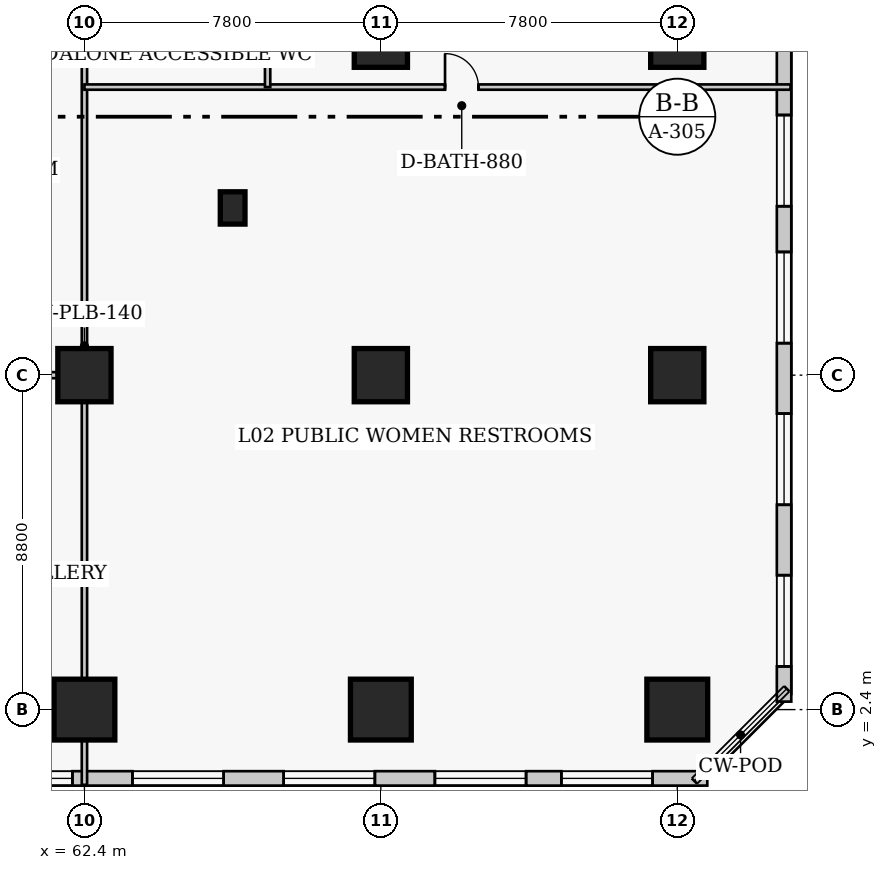
"""IFC4 building model, lengths in metres.
Left out: names, types, materials, properties, quantities, classifications, styles, units other than length and angle.
Written with IfcOpenShell. Run it as: python <this file> out.ifc"""

import sys

from ifc_helpers import new_model, si_unit, direction, frame, frame_2d, origin, origin_2d, place, context, subcontext, project, spatial, rectangle, extrude, element, fill, save


model = new_model("IFC4")
c1 = context("Model", 3, precision=1e-05, world=origin(), true_north=direction((0.0, 1.0)))
c2 = subcontext(c1, "Body", "Model", "MODEL_VIEW")
j1 = project(units=[si_unit("LENGTHUNIT", "METRE"), si_unit("PLANEANGLEUNIT", "RADIAN")], contexts=[c1])
p1 = place(None, origin())
s1 = spatial("IfcSite", under=j1, at=p1, CompositionType="ELEMENT")
p2 = place(p1, origin())
s2 = spatial("IfcBuilding", under=s1, at=p2, CompositionType="ELEMENT")
p3 = place(p2, frame((0.0, 0.0, 10.4)))
s3 = spatial("IfcBuildingStorey", under=s2, at=p3, CompositionType="ELEMENT", Elevation=10.4)
p4 = place(p3, frame((62.4, 2.4, 0.0), z_axis=(0.0, 0.0, 1.0), x_axis=(1.0, 0.0, 0.0)))
e1 = element("IfcColumn", 1, at=p4, inside=s3, PredefinedType="COLUMN", context=c2, shape_type="SweptSolid", body=[
    extrude(rectangle(XDim=1.6, YDim=1.6, at=origin_2d()), origin(), (0.0, 0.0, 1.0), 5.4),
])
p5 = place(p3, frame((62.4, 11.2, 0.0), z_axis=(0.0, 0.0, 1.0), x_axis=(1.0, 0.0, 0.0)))
e2 = element("IfcColumn", 2, at=p5, inside=s3, PredefinedType="COLUMN", context=c2, shape_type="SweptSolid", body=[
    extrude(rectangle(XDim=1.4, YDim=1.4, at=origin_2d()), origin(), (0.0, 0.0, 1.0), 5.4),
])
p6 = place(p3, frame((70.2, 2.4, 0.0), z_axis=(0.0, 0.0, 1.0), x_axis=(1.0, 0.0, 0.0)))
e3 = element("IfcColumn", 3, at=p6, inside=s3, PredefinedType="COLUMN", context=c2, shape_type="SweptSolid", body=[
    extrude(rectangle(XDim=1.6, YDim=1.6, at=origin_2d()), origin(), (0.0, 0.0, 1.0), 5.4),
])
for number, where, z_axis, x_axis in (
    (4, (70.2, 11.2, 0.0), (0.0, 0.0, 1.0), (1.0, 0.0, 0.0)),
    (5, (70.2, 20.0, 0.0), (0.0, 0.0, 1.0), (1.0, 0.0, 0.0)),
):
    element("IfcColumn", number, at=place(p3, frame(where, z_axis=z_axis, x_axis=x_axis)), inside=s3, PredefinedType="COLUMN", context=c2, shape_type="SweptSolid", body=[
        extrude(rectangle(XDim=1.4, YDim=1.4, at=origin_2d()), origin(), (0.0, 0.0, 1.0), 5.4),
    ])
p7 = place(p3, frame((78.0, 2.4, 0.0), z_axis=(0.0, 0.0, 1.0), x_axis=(1.0, 0.0, 0.0)))
e6 = element("IfcColumn", 6, at=p7, inside=s3, PredefinedType="COLUMN", context=c2, shape_type="SweptSolid", body=[
    extrude(rectangle(XDim=1.6, YDim=1.6, at=origin_2d()), origin(), (0.0, 0.0, 1.0), 5.4),
])
for number, where, z_axis, x_axis in (
    (7, (78.0, 11.2, 0.0), (0.0, 0.0, 1.0), (1.0, 0.0, 0.0)),
    (8, (78.0, 20.0, 0.0), (0.0, 0.0, 1.0), (1.0, 0.0, 0.0)),
):
    element("IfcColumn", number, at=place(p3, frame(where, z_axis=z_axis, x_axis=x_axis)), inside=s3, PredefinedType="COLUMN", context=c2, shape_type="SweptSolid", body=[
        extrude(rectangle(XDim=1.4, YDim=1.4, at=origin_2d()), origin(), (0.0, 0.0, 1.0), 5.4),
    ])
p8 = place(p3, frame((66.3, 15.6, 0.0), z_axis=(0.0, 0.0, 1.0), x_axis=(1.0, 0.0, 0.0)))
e9 = element("IfcColumn", 9, at=p8, inside=s3, PredefinedType="PILASTER", context=c2, shape_type="SweptSolid", body=[
    extrude(rectangle(XDim=0.65, YDim=0.85, at=origin_2d()), origin(), (0.0, 0.0, 1.0), 5.4),
])
p9 = place(p3, frame((-0.79, 0.59, 0.0), z_axis=(0.0, 0.0, 1.0), x_axis=(1.0, 0.0, 0.0)))
e10 = element("IfcWall", 10, at=p9, inside=s3, PredefinedType="SOLIDWALL", context=c2, shape_type="SweptSolid", body=[
    extrude(rectangle(XDim=79.58, YDim=0.38, at=frame_2d((39.79, 0.0))), origin(), (0.0, 0.0, 1.0), 5.1),
])
p10 = place(p9, frame((1.439, 0.0, 0.75)))
e11 = element("IfcOpeningElement", 11, at=p10, cuts=e10, PredefinedType="OPENING", context=c2, shape_type="SweptSolid", body=[
    extrude(rectangle(XDim=2.4, YDim=2.2, at=frame_2d((1.2, 1.1))), frame((0.0, 0.2, 0.0), z_axis=(0.0, -1.0, 0.0), x_axis=(1.0, 0.0, 0.0)), (0.0, 0.0, 1.0), 0.4),
])
p11 = place(p9, frame((4.769, 0.0, 0.75)))
e12 = element("IfcOpeningElement", 12, at=p11, cuts=e10, PredefinedType="OPENING", context=c2, shape_type="SweptSolid", body=[
    extrude(rectangle(XDim=2.4, YDim=2.2, at=frame_2d((1.2, 1.1))), frame((0.0, 0.2, 0.0), z_axis=(0.0, -1.0, 0.0), x_axis=(1.0, 0.0, 0.0)), (0.0, 0.0, 1.0), 0.4),
])
p12 = place(p9, frame((16.706, 0.0, 0.75)))
e13 = element("IfcOpeningElement", 13, at=p12, cuts=e10, PredefinedType="OPENING", context=c2, shape_type="SweptSolid", body=[
    extrude(rectangle(XDim=2.4, YDim=2.2, at=frame_2d((1.2, 1.1))), frame((0.0, 0.2, 0.0), z_axis=(0.0, -1.0, 0.0), x_axis=(1.0, 0.0, 0.0)), (0.0, 0.0, 1.0), 0.4),
])
p13 = place(p9, frame((20.685, 0.0, 0.75)))
e14 = element("IfcOpeningElement", 14, at=p13, cuts=e10, PredefinedType="OPENING", context=c2, shape_type="SweptSolid", body=[
    extrude(rectangle(XDim=2.4, YDim=2.2, at=frame_2d((1.2, 1.1))), frame((0.0, 0.2, 0.0), z_axis=(0.0, -1.0, 0.0), x_axis=(1.0, 0.0, 0.0)), (0.0, 0.0, 1.0), 0.4),
])
p14 = place(p9, frame((24.664, 0.0, 0.75)))
e15 = element("IfcOpeningElement", 15, at=p14, cuts=e10, PredefinedType="OPENING", context=c2, shape_type="SweptSolid", body=[
    extrude(rectangle(XDim=2.4, YDim=2.2, at=frame_2d((1.2, 1.1))), frame((0.0, 0.2, 0.0), z_axis=(0.0, -1.0, 0.0), x_axis=(1.0, 0.0, 0.0)), (0.0, 0.0, 1.0), 0.4),
])
p15 = place(p9, frame((28.643, 0.0, 0.75)))
e16 = element("IfcOpeningElement", 16, at=p15, cuts=e10, PredefinedType="OPENING", context=c2, shape_type="SweptSolid", body=[
    extrude(rectangle(XDim=2.4, YDim=2.2, at=frame_2d((1.2, 1.1))), frame((0.0, 0.2, 0.0), z_axis=(0.0, -1.0, 0.0), x_axis=(1.0, 0.0, 0.0)), (0.0, 0.0, 1.0), 0.4),
])
p16 = place(p9, frame((33.271, 0.0, 0.75)))
e17 = element("IfcOpeningElement", 17, at=p16, cuts=e10, PredefinedType="OPENING", context=c2, shape_type="SweptSolid", body=[
    extrude(rectangle(XDim=2.4, YDim=2.2, at=frame_2d((1.2, 1.1))), frame((0.0, 0.2, 0.0), z_axis=(0.0, -1.0, 0.0), x_axis=(1.0, 0.0, 0.0)), (0.0, 0.0, 1.0), 0.4),
])
p17 = place(p9, frame((37.75, 0.0, 0.75)))
e18 = element("IfcOpeningElement", 18, at=p17, cuts=e10, PredefinedType="OPENING", context=c2, shape_type="SweptSolid", body=[
    extrude(rectangle(XDim=2.4, YDim=2.2, at=frame_2d((1.2, 1.1))), frame((0.0, 0.2, 0.0), z_axis=(0.0, -1.0, 0.0), x_axis=(1.0, 0.0, 0.0)), (0.0, 0.0, 1.0), 0.4),
])
p18 = place(p9, frame((44.559, 0.0, 0.75)))
e19 = element("IfcOpeningElement", 19, at=p18, cuts=e10, PredefinedType="OPENING", context=c2, shape_type="SweptSolid", body=[
    extrude(rectangle(XDim=2.4, YDim=2.2, at=frame_2d((1.2, 1.1))), frame((0.0, 0.2, 0.0), z_axis=(0.0, -1.0, 0.0), x_axis=(1.0, 0.0, 0.0)), (0.0, 0.0, 1.0), 0.4),
])
p19 = place(p9, frame((48.538, 0.0, 0.75)))
e20 = element("IfcOpeningElement", 20, at=p19, cuts=e10, PredefinedType="OPENING", context=c2, shape_type="SweptSolid", body=[
    extrude(rectangle(XDim=2.4, YDim=2.2, at=frame_2d((1.2, 1.1))), frame((0.0, 0.2, 0.0), z_axis=(0.0, -1.0, 0.0), x_axis=(1.0, 0.0, 0.0)), (0.0, 0.0, 1.0), 0.4),
])
p20 = place(p9, frame((52.517, 0.0, 0.75)))
e21 = element("IfcOpeningElement", 21, at=p20, cuts=e10, PredefinedType="OPENING", context=c2, shape_type="SweptSolid", body=[
    extrude(rectangle(XDim=2.4, YDim=2.2, at=frame_2d((1.2, 1.1))), frame((0.0, 0.2, 0.0), z_axis=(0.0, -1.0, 0.0), x_axis=(1.0, 0.0, 0.0)), (0.0, 0.0, 1.0), 0.4),
])
p21 = place(p9, frame((56.496, 0.0, 0.75)))
e22 = element("IfcOpeningElement", 22, at=p21, cuts=e10, PredefinedType="OPENING", context=c2, shape_type="SweptSolid", body=[
    extrude(rectangle(XDim=2.4, YDim=2.2, at=frame_2d((1.2, 1.1))), frame((0.0, 0.2, 0.0), z_axis=(0.0, -1.0, 0.0), x_axis=(1.0, 0.0, 0.0)), (0.0, 0.0, 1.0), 0.4),
])
p22 = place(p9, frame((60.475, 0.0, 0.75)))
e23 = element("IfcOpeningElement", 23, at=p22, cuts=e10, PredefinedType="OPENING", context=c2, shape_type="SweptSolid", body=[
    extrude(rectangle(XDim=2.4, YDim=2.2, at=frame_2d((1.2, 1.1))), frame((0.0, 0.2, 0.0), z_axis=(0.0, -1.0, 0.0), x_axis=(1.0, 0.0, 0.0)), (0.0, 0.0, 1.0), 0.4),
])
p23 = place(p9, frame((64.454, 0.0, 0.75)))
e24 = element("IfcOpeningElement", 24, at=p23, cuts=e10, PredefinedType="OPENING", context=c2, shape_type="SweptSolid", body=[
    extrude(rectangle(XDim=2.4, YDim=2.2, at=frame_2d((1.2, 1.1))), frame((0.0, 0.2, 0.0), z_axis=(0.0, -1.0, 0.0), x_axis=(1.0, 0.0, 0.0)), (0.0, 0.0, 1.0), 0.4),
])
p24 = place(p9, frame((68.433, 0.0, 0.75)))
e25 = element("IfcOpeningElement", 25, at=p24, cuts=e10, PredefinedType="OPENING", context=c2, shape_type="SweptSolid", body=[
    extrude(rectangle(XDim=2.4, YDim=2.2, at=frame_2d((1.2, 1.1))), frame((0.0, 0.2, 0.0), z_axis=(0.0, -1.0, 0.0), x_axis=(1.0, 0.0, 0.0)), (0.0, 0.0, 1.0), 0.4),
])
p25 = place(p9, frame((72.412, 0.0, 0.75)))
e26 = element("IfcOpeningElement", 26, at=p25, cuts=e10, PredefinedType="OPENING", context=c2, shape_type="SweptSolid", body=[
    extrude(rectangle(XDim=2.4, YDim=2.2, at=frame_2d((1.2, 1.1))), frame((0.0, 0.2, 0.0), z_axis=(0.0, -1.0, 0.0), x_axis=(1.0, 0.0, 0.0)), (0.0, 0.0, 1.0), 0.4),
])
p26 = place(p9, frame((75.74, 0.0, 0.75)))
e27 = element("IfcOpeningElement", 27, at=p26, cuts=e10, PredefinedType="OPENING", context=c2, shape_type="SweptSolid", body=[
    extrude(rectangle(XDim=2.4, YDim=2.2, at=frame_2d((1.2, 1.1))), frame((0.0, 0.2, 0.0), z_axis=(0.0, -1.0, 0.0), x_axis=(1.0, 0.0, 0.0)), (0.0, 0.0, 1.0), 0.4),
])
p27 = place(p3, frame((80.81, 2.61, 0.0), z_axis=(0.0, 0.0, 1.0), x_axis=(0.0, 1.0, 0.0)))
e28 = element("IfcWall", 28, at=p27, inside=s3, PredefinedType="SOLIDWALL", context=c2, shape_type="SweptSolid", body=[
    extrude(rectangle(XDim=46.78, YDim=0.38, at=frame_2d((23.39, 0.0))), origin(), (0.0, 0.0, 1.0), 5.1),
])
p28 = place(p27, frame((0.927, 0.0, 0.75)))
e29 = element("IfcOpeningElement", 29, at=p28, cuts=e28, PredefinedType="OPENING", context=c2, shape_type="SweptSolid", body=[
    extrude(rectangle(XDim=2.4, YDim=2.2, at=frame_2d((1.2, 1.1))), frame((0.0, 0.2, 0.0), z_axis=(0.0, -1.0, 0.0), x_axis=(1.0, 0.0, 0.0)), (0.0, 0.0, 1.0), 0.4),
])
p29 = place(p27, frame((5.179, 0.0, 0.75)))
e30 = element("IfcOpeningElement", 30, at=p29, cuts=e28, PredefinedType="OPENING", context=c2, shape_type="SweptSolid", body=[
    extrude(rectangle(XDim=2.4, YDim=2.2, at=frame_2d((1.2, 1.1))), frame((0.0, 0.2, 0.0), z_axis=(0.0, -1.0, 0.0), x_axis=(1.0, 0.0, 0.0)), (0.0, 0.0, 1.0), 0.4),
])
p30 = place(p27, frame((9.432, 0.0, 0.75)))
e31 = element("IfcOpeningElement", 31, at=p30, cuts=e28, PredefinedType="OPENING", context=c2, shape_type="SweptSolid", body=[
    extrude(rectangle(XDim=2.4, YDim=2.2, at=frame_2d((1.2, 1.1))), frame((0.0, 0.2, 0.0), z_axis=(0.0, -1.0, 0.0), x_axis=(1.0, 0.0, 0.0)), (0.0, 0.0, 1.0), 0.4),
])
p31 = place(p27, frame((13.034, 0.0, 0.75)))
e32 = element("IfcOpeningElement", 32, at=p31, cuts=e28, PredefinedType="OPENING", context=c2, shape_type="SweptSolid", body=[
    extrude(rectangle(XDim=2.4, YDim=2.2, at=frame_2d((1.2, 1.1))), frame((0.0, 0.2, 0.0), z_axis=(0.0, -1.0, 0.0), x_axis=(1.0, 0.0, 0.0)), (0.0, 0.0, 1.0), 0.4),
])
p32 = place(p27, frame((17.937, 0.0, 0.75)))
e33 = element("IfcOpeningElement", 33, at=p32, cuts=e28, PredefinedType="OPENING", context=c2, shape_type="SweptSolid", body=[
    extrude(rectangle(XDim=2.4, YDim=2.2, at=frame_2d((1.2, 1.1))), frame((0.0, 0.2, 0.0), z_axis=(0.0, -1.0, 0.0), x_axis=(1.0, 0.0, 0.0)), (0.0, 0.0, 1.0), 0.4),
])
p33 = place(p27, frame((26.443, 0.0, 0.75)))
e34 = element("IfcOpeningElement", 34, at=p33, cuts=e28, PredefinedType="OPENING", context=c2, shape_type="SweptSolid", body=[
    extrude(rectangle(XDim=2.4, YDim=2.2, at=frame_2d((1.2, 1.1))), frame((0.0, 0.2, 0.0), z_axis=(0.0, -1.0, 0.0), x_axis=(1.0, 0.0, 0.0)), (0.0, 0.0, 1.0), 0.4),
])
p34 = place(p27, frame((30.696, 0.0, 0.75)))
e35 = element("IfcOpeningElement", 35, at=p34, cuts=e28, PredefinedType="OPENING", context=c2, shape_type="SweptSolid", body=[
    extrude(rectangle(XDim=2.4, YDim=2.2, at=frame_2d((1.2, 1.1))), frame((0.0, 0.2, 0.0), z_axis=(0.0, -1.0, 0.0), x_axis=(1.0, 0.0, 0.0)), (0.0, 0.0, 1.0), 0.4),
])
p35 = place(p27, frame((34.948, 0.0, 0.75)))
e36 = element("IfcOpeningElement", 36, at=p35, cuts=e28, PredefinedType="OPENING", context=c2, shape_type="SweptSolid", body=[
    extrude(rectangle(XDim=2.4, YDim=2.2, at=frame_2d((1.2, 1.1))), frame((0.0, 0.2, 0.0), z_axis=(0.0, -1.0, 0.0), x_axis=(1.0, 0.0, 0.0)), (0.0, 0.0, 1.0), 0.4),
])
p36 = place(p27, frame((39.201, 0.0, 0.75)))
e37 = element("IfcOpeningElement", 37, at=p36, cuts=e28, PredefinedType="OPENING", context=c2, shape_type="SweptSolid", body=[
    extrude(rectangle(XDim=2.4, YDim=2.2, at=frame_2d((1.2, 1.1))), frame((0.0, 0.2, 0.0), z_axis=(0.0, -1.0, 0.0), x_axis=(1.0, 0.0, 0.0)), (0.0, 0.0, 1.0), 0.4),
])
p37 = place(p27, frame((43.454, 0.0, 0.75)))
e38 = element("IfcOpeningElement", 38, at=p37, cuts=e28, PredefinedType="OPENING", context=c2, shape_type="SweptSolid", body=[
    extrude(rectangle(XDim=2.4, YDim=2.2, at=frame_2d((1.2, 1.1))), frame((0.0, 0.2, 0.0), z_axis=(0.0, -1.0, 0.0), x_axis=(1.0, 0.0, 0.0)), (0.0, 0.0, 1.0), 0.4),
])
p38 = place(p3, frame((14.4, 11.2, 0.0), z_axis=(0.0, 0.0, 1.0), x_axis=(1.0, 0.0, 0.0)))
e39 = element("IfcWall", 39, at=p38, inside=s3, PredefinedType="PARTITIONING", context=c2, shape_type="SweptSolid", body=[
    extrude(rectangle(XDim=48.0, YDim=0.16, at=frame_2d((24.0, 0.0))), origin(), (0.0, 0.0, 1.0), 4.06),
])
p39 = place(p38, frame((28.55, 0.0, 0.0)))
e40 = element("IfcOpeningElement", 40, at=p39, cuts=e39, PredefinedType="OPENING", context=c2, shape_type="SweptSolid", body=[
    extrude(rectangle(XDim=1.1, YDim=2.15, at=frame_2d((0.55, 1.075))), frame((0.0, 0.09, 0.0), z_axis=(0.0, -1.0, 0.0), x_axis=(1.0, 0.0, 0.0)), (0.0, 0.0, 1.0), 0.18),
])
p40 = place(p38, frame((19.0, 0.0, 0.0)))
e41 = element("IfcOpeningElement", 41, at=p40, cuts=e39, PredefinedType="OPENING", context=c2, shape_type="SweptSolid", body=[
    extrude(rectangle(XDim=2.2, YDim=2.4, at=frame_2d((1.1, 1.2))), frame((0.0, 0.09, 0.0), z_axis=(0.0, -1.0, 0.0), x_axis=(1.0, 0.0, 0.0)), (0.0, 0.0, 1.0), 0.18),
])
p41 = place(p38, frame((34.688, 0.0, 0.0)))
e42 = element("IfcOpeningElement", 42, at=p41, cuts=e39, PredefinedType="OPENING", context=c2, shape_type="SweptSolid", body=[
    extrude(rectangle(XDim=2.2, YDim=2.4, at=frame_2d((1.1, 1.2))), frame((0.0, 0.09, 0.0), z_axis=(0.0, -1.0, 0.0), x_axis=(1.0, 0.0, 0.0)), (0.0, 0.0, 1.0), 0.18),
])
p42 = place(p3, frame((62.4, 0.42, 0.0), z_axis=(0.0, 0.0, 1.0), x_axis=(0.0, 1.0, 0.0)))
e43 = element("IfcWall", 43, at=p42, inside=s3, PredefinedType="PLUMBINGWALL", context=c2, shape_type="SweptSolid", body=[
    extrude(rectangle(XDim=23.1, YDim=0.14, at=frame_2d((11.55, 0.0))), origin(), (0.0, 0.0, 1.0), 4.35),
])
p43 = place(p3, frame((62.4, 18.78, 0.0), z_axis=(0.0, 0.0, 1.0), x_axis=(1.0, 0.0, 0.0)))
e44 = element("IfcWall", 44, at=p43, inside=s3, PredefinedType="PLUMBINGWALL", context=c2, shape_type="SweptSolid", body=[
    extrude(rectangle(XDim=18.58, YDim=0.14, at=frame_2d((9.29, 0.0))), origin(), (0.0, 0.0, 1.0), 5.1),
])
p44 = place(p43, frame((9.489, 0.0, 0.0)))
e45 = element("IfcOpeningElement", 45, at=p44, cuts=e44, PredefinedType="OPENING", context=c2, shape_type="SweptSolid", body=[
    extrude(rectangle(XDim=0.88, YDim=2.05, at=frame_2d((0.44, 1.025))), frame((0.0, 0.08, 0.0), z_axis=(0.0, -1.0, 0.0), x_axis=(1.0, 0.0, 0.0)), (0.0, 0.0, 1.0), 0.16),
])
p45 = place(p3, frame((67.22, 18.78, 0.0), z_axis=(0.0, 0.0, 1.0), x_axis=(0.0, 1.0, 0.0)))
e46 = element("IfcWall", 46, at=p45, inside=s3, PredefinedType="PLUMBINGWALL", context=c2, shape_type="SweptSolid", body=[
    extrude(rectangle(XDim=4.74, YDim=0.14, at=frame_2d((2.37, 0.0))), origin(), (0.0, 0.0, 1.0), 5.1),
])
p46 = place(p22, origin())
e47 = element("IfcWindow", 47, at=p46, inside=s3, PartitioningType="SINGLE_PANEL", PredefinedType="WINDOW", context=c2, shape_type="SweptSolid", body=[
    extrude(rectangle(XDim=2.4, YDim=2.2, at=frame_2d((1.2, 1.1))), frame((0.0, 0.03, 0.0), z_axis=(0.0, -1.0, 0.0), x_axis=(1.0, 0.0, 0.0)), (0.0, 0.0, 1.0), 0.06),
])
fill(e23, e47)
p47 = place(p23, origin())
e48 = element("IfcWindow", 48, at=p47, inside=s3, PartitioningType="SINGLE_PANEL", PredefinedType="WINDOW", context=c2, shape_type="SweptSolid", body=[
    extrude(rectangle(XDim=2.4, YDim=2.2, at=frame_2d((1.2, 1.1))), frame((0.0, 0.03, 0.0), z_axis=(0.0, -1.0, 0.0), x_axis=(1.0, 0.0, 0.0)), (0.0, 0.0, 1.0), 0.06),
])
fill(e24, e48)
p48 = place(p24, origin())
e49 = element("IfcWindow", 49, at=p48, inside=s3, PartitioningType="SINGLE_PANEL", PredefinedType="WINDOW", context=c2, shape_type="SweptSolid", body=[
    extrude(rectangle(XDim=2.4, YDim=2.2, at=frame_2d((1.2, 1.1))), frame((0.0, 0.03, 0.0), z_axis=(0.0, -1.0, 0.0), x_axis=(1.0, 0.0, 0.0)), (0.0, 0.0, 1.0), 0.06),
])
fill(e25, e49)
p49 = place(p25, origin())
e50 = element("IfcWindow", 50, at=p49, inside=s3, PartitioningType="SINGLE_PANEL", PredefinedType="WINDOW", context=c2, shape_type="SweptSolid", body=[
    extrude(rectangle(XDim=2.4, YDim=2.2, at=frame_2d((1.2, 1.1))), frame((0.0, 0.03, 0.0), z_axis=(0.0, -1.0, 0.0), x_axis=(1.0, 0.0, 0.0)), (0.0, 0.0, 1.0), 0.06),
])
fill(e26, e50)
p50 = place(p26, origin())
e51 = element("IfcWindow", 51, at=p50, inside=s3, PartitioningType="SINGLE_PANEL", PredefinedType="WINDOW", context=c2, shape_type="SweptSolid", body=[
    extrude(rectangle(XDim=2.4, YDim=2.2, at=frame_2d((1.2, 1.1))), frame((0.0, 0.03, 0.0), z_axis=(0.0, -1.0, 0.0), x_axis=(1.0, 0.0, 0.0)), (0.0, 0.0, 1.0), 0.06),
])
fill(e27, e51)
p51 = place(p28, origin())
e52 = element("IfcWindow", 52, at=p51, inside=s3, PartitioningType="SINGLE_PANEL", PredefinedType="WINDOW", context=c2, shape_type="SweptSolid", body=[
    extrude(rectangle(XDim=2.4, YDim=2.2, at=frame_2d((1.2, 1.1))), frame((0.0, 0.03, 0.0), z_axis=(0.0, -1.0, 0.0), x_axis=(1.0, 0.0, 0.0)), (0.0, 0.0, 1.0), 0.06),
])
fill(e29, e52)
p52 = place(p29, origin())
e53 = element("IfcWindow", 53, at=p52, inside=s3, PartitioningType="SINGLE_PANEL", PredefinedType="WINDOW", context=c2, shape_type="SweptSolid", body=[
    extrude(rectangle(XDim=2.4, YDim=2.2, at=frame_2d((1.2, 1.1))), frame((0.0, 0.03, 0.0), z_axis=(0.0, -1.0, 0.0), x_axis=(1.0, 0.0, 0.0)), (0.0, 0.0, 1.0), 0.06),
])
fill(e30, e53)
p53 = place(p30, origin())
e54 = element("IfcWindow", 54, at=p53, inside=s3, PartitioningType="SINGLE_PANEL", PredefinedType="WINDOW", context=c2, shape_type="SweptSolid", body=[
    extrude(rectangle(XDim=2.4, YDim=2.2, at=frame_2d((1.2, 1.1))), frame((0.0, 0.03, 0.0), z_axis=(0.0, -1.0, 0.0), x_axis=(1.0, 0.0, 0.0)), (0.0, 0.0, 1.0), 0.06),
])
fill(e31, e54)
p54 = place(p31, origin())
e55 = element("IfcWindow", 55, at=p54, inside=s3, PartitioningType="SINGLE_PANEL", PredefinedType="WINDOW", context=c2, shape_type="SweptSolid", body=[
    extrude(rectangle(XDim=2.4, YDim=2.2, at=frame_2d((1.2, 1.1))), frame((0.0, 0.03, 0.0), z_axis=(0.0, -1.0, 0.0), x_axis=(1.0, 0.0, 0.0)), (0.0, 0.0, 1.0), 0.06),
])
fill(e32, e55)
p55 = place(p44, origin())
e56 = element("IfcDoor", 56, at=p55, inside=s3, OperationType="SINGLE_SWING_LEFT", PredefinedType="DOOR", context=c2, shape_type="SweptSolid", body=[
    extrude(rectangle(XDim=0.88, YDim=2.05, at=frame_2d((0.44, 1.025))), frame((0.0, 0.025, 0.0), z_axis=(0.0, -1.0, 0.0), x_axis=(1.0, 0.0, 0.0)), (0.0, 0.0, 1.0), 0.05),
])
fill(e45, e56)
save(model, sys.argv[1])
